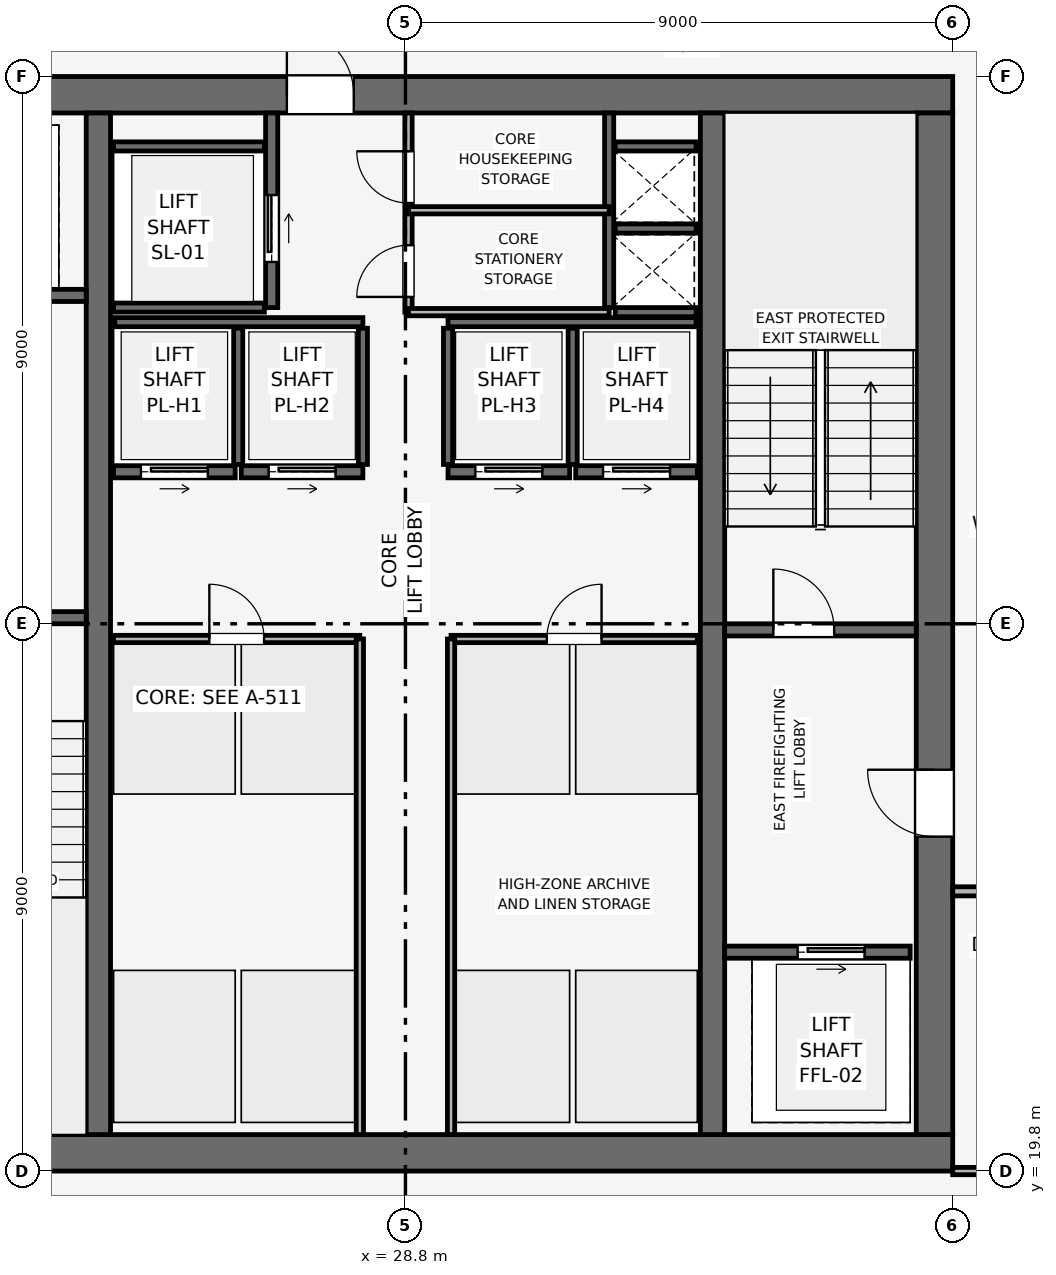
"""IFC4 building model, lengths in metres.
Left out: names, types, materials, properties, quantities, classifications, styles, units other than length and angle.
Written with IfcOpenShell. Run it as: python <this file> out.ifc"""

import sys

from ifc_helpers import new_model, si_unit, direction, frame, frame_2d, origin, place, context, subcontext, project, spatial, rectangle, extrude, element, fill, save


model = new_model("IFC4")
c1 = context("Model", 3, precision=1e-05, world=origin(), true_north=direction((0.0, 1.0)))
c2 = subcontext(c1, "Body", "Model", "MODEL_VIEW")
j1 = project(units=[si_unit("LENGTHUNIT", "METRE"), si_unit("PLANEANGLEUNIT", "RADIAN")], contexts=[c1])
p1 = place(None, origin())
s1 = spatial("IfcSite", under=j1, at=p1, CompositionType="ELEMENT")
p2 = place(p1, origin())
s2 = spatial("IfcBuilding", under=s1, at=p2, CompositionType="ELEMENT")
p3 = place(p2, frame((0.0, 0.0, 340.5)))
s3 = spatial("IfcBuildingStorey", under=s2, at=p3, CompositionType="ELEMENT", Elevation=340.5)
p4 = place(p3, frame((19.8, 20.1, 0.0), z_axis=(0.0, 0.0, 1.0), x_axis=(1.0, 0.0, 0.0)))
e1 = element("IfcWall", 1, at=p4, inside=s3, PredefinedType="SHEAR", context=c2, shape_type="SweptSolid", body=[
    extrude(rectangle(XDim=18.0, YDim=0.6, at=frame_2d((9.0, 0.0))), origin(), (0.0, 0.0, 1.0), 3.75),
])
p5 = place(p3, frame((19.8, 37.5, 0.0), z_axis=(0.0, 0.0, 1.0), x_axis=(1.0, 0.0, 0.0)))
e2 = element("IfcWall", 2, at=p5, inside=s3, PredefinedType="SHEAR", context=c2, shape_type="SweptSolid", body=[
    extrude(rectangle(XDim=18.0, YDim=0.6, at=frame_2d((9.0, 0.0))), origin(), (0.0, 0.0, 1.0), 3.75),
])
p6 = place(p5, frame((7.05, 0.0, 0.0)))
e3 = element("IfcOpeningElement", 3, at=p6, cuts=e2, PredefinedType="OPENING", context=c2, shape_type="SweptSolid", body=[
    extrude(rectangle(XDim=1.1, YDim=2.15, at=frame_2d((0.55, 1.075))), frame((0.0, 0.31, 0.0), z_axis=(0.0, -1.0, 0.0), x_axis=(1.0, 0.0, 0.0)), (0.0, 0.0, 1.0), 0.62),
])
p7 = place(p3, frame((37.5, 20.4, 0.0), z_axis=(0.0, 0.0, 1.0), x_axis=(0.0, 1.0, 0.0)))
e4 = element("IfcWall", 4, at=p7, inside=s3, PredefinedType="SHEAR", context=c2, shape_type="SweptSolid", body=[
    extrude(rectangle(XDim=16.8, YDim=0.6, at=frame_2d((8.4, 0.0))), origin(), (0.0, 0.0, 1.0), 3.75),
])
p8 = place(p7, frame((4.9, 0.0, 0.0)))
e5 = element("IfcOpeningElement", 5, at=p8, cuts=e4, PredefinedType="OPENING", context=c2, shape_type="SweptSolid", body=[
    extrude(rectangle(XDim=1.1, YDim=2.15, at=frame_2d((0.55, 1.075))), frame((0.0, 0.31, 0.0), z_axis=(0.0, -1.0, 0.0), x_axis=(1.0, 0.0, 0.0)), (0.0, 0.0, 1.0), 0.62),
])
for number, where, z_axis, x_axis in (
    (6, (23.75, 20.4, 0.0), (0.0, 0.0, 1.0), (0.0, 1.0, 0.0)),
    (7, (33.85, 20.4, 0.0), (0.0, 0.0, 1.0), (0.0, 1.0, 0.0)),
):
    element("IfcWall", number, at=place(p3, frame(where, z_axis=z_axis, x_axis=x_axis)), inside=s3, PredefinedType="SHEAR", context=c2, shape_type="SweptSolid", body=[
        extrude(rectangle(XDim=16.8, YDim=0.4, at=frame_2d((8.4, 0.0))), origin(), (0.0, 0.0, 1.0), 3.75),
    ])
p9 = place(p3, frame((20.4, 28.9, 0.0), z_axis=(0.0, 0.0, 1.0), x_axis=(1.0, 0.0, 0.0)))
e8 = element("IfcWall", 8, at=p9, inside=s3, PredefinedType="SHEAR", context=c2, shape_type="SweptSolid", body=[
    extrude(rectangle(XDim=3.15, YDim=0.2, at=frame_2d((1.575, 0.0))), origin(), (0.0, 0.0, 1.0), 3.51),
])
p10 = place(p9, frame((0.8, 0.0, 0.0)))
e9 = element("IfcOpeningElement", 9, at=p10, cuts=e8, PredefinedType="OPENING", context=c2, shape_type="SweptSolid", body=[
    extrude(rectangle(XDim=1.0, YDim=2.1, at=frame_2d((0.5, 1.05))), frame((0.0, 0.11, 0.0), z_axis=(0.0, -1.0, 0.0), x_axis=(1.0, 0.0, 0.0)), (0.0, 0.0, 1.0), 0.22),
])
p11 = place(p3, frame((34.05, 28.7, 0.0), z_axis=(0.0, 0.0, 1.0), x_axis=(1.0, 0.0, 0.0)))
e10 = element("IfcWall", 10, at=p11, inside=s3, PredefinedType="SHEAR", context=c2, shape_type="SweptSolid", body=[
    extrude(rectangle(XDim=3.15, YDim=0.2, at=frame_2d((1.575, 0.0))), origin(), (0.0, 0.0, 1.0), 3.51),
])
p12 = place(p11, frame((0.8, 0.0, 0.0)))
e11 = element("IfcOpeningElement", 11, at=p12, cuts=e10, PredefinedType="OPENING", context=c2, shape_type="SweptSolid", body=[
    extrude(rectangle(XDim=1.0, YDim=2.1, at=frame_2d((0.5, 1.05))), frame((0.0, 0.11, 0.0), z_axis=(0.0, -1.0, 0.0), x_axis=(1.0, 0.0, 0.0)), (0.0, 0.0, 1.0), 0.22),
])
p13 = place(p3, frame((32.15, 34.0, 0.0), z_axis=(0.0, 0.0, 1.0), x_axis=(0.0, 1.0, 0.0)))
e12 = element("IfcWall", 12, at=p13, inside=s3, PredefinedType="SHEAR", context=c2, shape_type="SweptSolid", body=[
    extrude(rectangle(XDim=3.2, YDim=0.15, at=frame_2d((1.6, 0.0))), origin(), (0.0, 0.0, 1.0), 3.51),
])
for number, where, z_axis, x_axis in (
    (13, (32.25, 33.925, 0.0), (0.0, 0.0, 1.0), (1.0, 0.0, 0.0)),
    (14, (32.25, 35.3, 0.0), (0.0, 0.0, 1.0), (1.0, 0.0, 0.0)),
):
    element("IfcWall", number, at=place(p3, frame(where, z_axis=z_axis, x_axis=x_axis)), inside=s3, PredefinedType="SHEAR", context=c2, shape_type="SweptSolid", body=[
        extrude(rectangle(XDim=1.33, YDim=0.15, at=frame_2d((0.665, 0.0))), origin(), (0.0, 0.0, 1.0), 3.51),
    ])
p14 = place(p3, frame((20.5, 34.2, 0.0), z_axis=(0.0, 0.0, 1.0), x_axis=(1.0, 0.0, 0.0)))
e15 = element("IfcWall", 15, at=p14, inside=s3, PredefinedType="SHEAR", context=c2, shape_type="SweptSolid", body=[
    extrude(rectangle(XDim=3.05, YDim=0.2, at=frame_2d((1.525, 0.0))), origin(), (0.0, 0.0, 1.0), 3.51),
])
p15 = place(p14, frame((0.75, 0.0, 0.0)))
e16 = element("IfcOpeningElement", 16, at=p15, cuts=e15, PredefinedType="OPENING", context=c2, shape_type="SweptSolid", body=[
    extrude(rectangle(XDim=1.1, YDim=2.15, at=frame_2d((0.55, 1.075))), frame((0.0, 0.11, 0.0), z_axis=(0.0, -1.0, 0.0), x_axis=(1.0, 0.0, 0.0)), (0.0, 0.0, 1.0), 0.22),
])
p16 = place(p3, frame((34.05, 23.4, 0.0), z_axis=(0.0, 0.0, 1.0), x_axis=(1.0, 0.0, 0.0)))
e17 = element("IfcWall", 17, at=p16, inside=s3, PredefinedType="SHEAR", context=c2, shape_type="SweptSolid", body=[
    extrude(rectangle(XDim=3.05, YDim=0.2, at=frame_2d((1.525, 0.0))), origin(), (0.0, 0.0, 1.0), 3.51),
])
p17 = place(p16, frame((1.2, 0.0, 0.0)))
e18 = element("IfcOpeningElement", 18, at=p17, cuts=e17, PredefinedType="OPENING", context=c2, shape_type="SweptSolid", body=[
    extrude(rectangle(XDim=1.1, YDim=2.15, at=frame_2d((0.55, 1.075))), frame((0.0, 0.11, 0.0), z_axis=(0.0, -1.0, 0.0), x_axis=(1.0, 0.0, 0.0)), (0.0, 0.0, 1.0), 0.22),
])
p18 = place(p3, frame((26.6, 34.0, 0.0), z_axis=(0.0, 0.0, 1.0), x_axis=(0.0, 1.0, 0.0)))
e19 = element("IfcWall", 19, at=p18, inside=s3, PredefinedType="SHEAR", context=c2, shape_type="SweptSolid", body=[
    extrude(rectangle(XDim=3.2, YDim=0.2, at=frame_2d((1.6, 0.0))), origin(), (0.0, 0.0, 1.0), 3.51),
])
p19 = place(p18, frame((0.75, 0.0, 0.0)))
e20 = element("IfcOpeningElement", 20, at=p19, cuts=e19, PredefinedType="OPENING", context=c2, shape_type="SweptSolid", body=[
    extrude(rectangle(XDim=1.1, YDim=2.15, at=frame_2d((0.55, 1.075))), frame((0.0, 0.11, 0.0), z_axis=(0.0, -1.0, 0.0), x_axis=(1.0, 0.0, 0.0)), (0.0, 0.0, 1.0), 0.22),
])
for number, where, z_axis, x_axis in (
    (21, (24.0, 34.0, 0.0), (0.0, 0.0, 1.0), (1.0, 0.0, 0.0)),
    (22, (24.0, 36.65, 0.0), (0.0, 0.0, 1.0), (1.0, 0.0, 0.0)),
):
    element("IfcWall", number, at=place(p3, frame(where, z_axis=z_axis, x_axis=x_axis)), inside=s3, PredefinedType="SHEAR", context=c2, shape_type="SweptSolid", body=[
        extrude(rectangle(XDim=2.48, YDim=0.15, at=frame_2d((1.24, 0.0))), origin(), (0.0, 0.0, 1.0), 3.51),
    ])
p20 = place(p3, frame((24.0, 31.3, 0.0), z_axis=(0.0, 0.0, 1.0), x_axis=(1.0, 0.0, 0.0)))
e23 = element("IfcWall", 23, at=p20, inside=s3, PredefinedType="SHEAR", context=c2, shape_type="SweptSolid", body=[
    extrude(rectangle(XDim=2.0, YDim=0.2, at=frame_2d((1.0, 0.0))), origin(), (0.0, 0.0, 1.0), 3.51),
])
p21 = place(p20, frame((0.45, 0.0, 0.0)))
e24 = element("IfcOpeningElement", 24, at=p21, cuts=e23, PredefinedType="OPENING", context=c2, shape_type="SweptSolid", body=[
    extrude(rectangle(XDim=1.1, YDim=2.15, at=frame_2d((0.55, 1.075))), frame((0.0, 0.11, 0.0), z_axis=(0.0, -1.0, 0.0), x_axis=(1.0, 0.0, 0.0)), (0.0, 0.0, 1.0), 0.22),
])
p22 = place(p3, frame((26.1, 31.3, 0.0), z_axis=(0.0, 0.0, 1.0), x_axis=(1.0, 0.0, 0.0)))
e25 = element("IfcWall", 25, at=p22, inside=s3, PredefinedType="SHEAR", context=c2, shape_type="SweptSolid", body=[
    extrude(rectangle(XDim=2.0, YDim=0.2, at=frame_2d((1.0, 0.0))), origin(), (0.0, 0.0, 1.0), 3.51),
])
p23 = place(p22, frame((0.45, 0.0, 0.0)))
e26 = element("IfcOpeningElement", 26, at=p23, cuts=e25, PredefinedType="OPENING", context=c2, shape_type="SweptSolid", body=[
    extrude(rectangle(XDim=1.1, YDim=2.15, at=frame_2d((0.55, 1.075))), frame((0.0, 0.11, 0.0), z_axis=(0.0, -1.0, 0.0), x_axis=(1.0, 0.0, 0.0)), (0.0, 0.0, 1.0), 0.22),
])
p24 = place(p3, frame((29.5, 31.3, 0.0), z_axis=(0.0, 0.0, 1.0), x_axis=(1.0, 0.0, 0.0)))
e27 = element("IfcWall", 27, at=p24, inside=s3, PredefinedType="SHEAR", context=c2, shape_type="SweptSolid", body=[
    extrude(rectangle(XDim=2.0, YDim=0.2, at=frame_2d((1.0, 0.0))), origin(), (0.0, 0.0, 1.0), 3.51),
])
p25 = place(p24, frame((0.45, 0.0, 0.0)))
e28 = element("IfcOpeningElement", 28, at=p25, cuts=e27, PredefinedType="OPENING", context=c2, shape_type="SweptSolid", body=[
    extrude(rectangle(XDim=1.1, YDim=2.15, at=frame_2d((0.55, 1.075))), frame((0.0, 0.11, 0.0), z_axis=(0.0, -1.0, 0.0), x_axis=(1.0, 0.0, 0.0)), (0.0, 0.0, 1.0), 0.22),
])
p26 = place(p3, frame((31.6, 31.3, 0.0), z_axis=(0.0, 0.0, 1.0), x_axis=(1.0, 0.0, 0.0)))
e29 = element("IfcWall", 29, at=p26, inside=s3, PredefinedType="SHEAR", context=c2, shape_type="SweptSolid", body=[
    extrude(rectangle(XDim=2.0, YDim=0.2, at=frame_2d((1.0, 0.0))), origin(), (0.0, 0.0, 1.0), 3.51),
])
p27 = place(p26, frame((0.45, 0.0, 0.0)))
e30 = element("IfcOpeningElement", 30, at=p27, cuts=e29, PredefinedType="OPENING", context=c2, shape_type="SweptSolid", body=[
    extrude(rectangle(XDim=1.1, YDim=2.15, at=frame_2d((0.55, 1.075))), frame((0.0, 0.11, 0.0), z_axis=(0.0, -1.0, 0.0), x_axis=(1.0, 0.0, 0.0)), (0.0, 0.0, 1.0), 0.22),
])
p28 = place(p3, frame((32.25, 36.65, 0.0), z_axis=(0.0, 0.0, 1.0), x_axis=(1.0, 0.0, 0.0)))
e31 = element("IfcWall", 31, at=p28, inside=s3, PredefinedType="SHEAR", context=c2, shape_type="SweptSolid", body=[
    extrude(rectangle(XDim=1.33, YDim=0.15, at=frame_2d((0.665, 0.0))), origin(), (0.0, 0.0, 1.0), 3.51),
])
for number, where, z_axis, x_axis in (
    (32, (24.02, 33.76, 0.0), (0.0, 0.0, 1.0), (1.0, 0.0, 0.0)),
    (33, (29.5, 33.76, 0.0), (0.0, 0.0, 1.0), (1.0, 0.0, 0.0)),
):
    element("IfcWall", number, at=place(p3, frame(where, z_axis=z_axis, x_axis=x_axis)), inside=s3, PredefinedType="SHEAR", context=c2, shape_type="SweptSolid", body=[
        extrude(rectangle(XDim=4.08, YDim=0.15, at=frame_2d((2.04, 0.0))), origin(), (0.0, 0.0, 1.0), 3.51),
    ])
for number, where, z_axis, x_axis in (
    (34, (26.05, 31.42, 0.0), (0.0, 0.0, 1.0), (0.0, 1.0, 0.0)),
    (35, (28.1, 31.42, 0.0), (0.0, 0.0, 1.0), (0.0, 1.0, 0.0)),
    (36, (29.5, 31.42, 0.0), (0.0, 0.0, 1.0), (0.0, 1.0, 0.0)),
    (37, (31.55, 31.42, 0.0), (0.0, 0.0, 1.0), (0.0, 1.0, 0.0)),
):
    element("IfcWall", number, at=place(p3, frame(where, z_axis=z_axis, x_axis=x_axis)), inside=s3, PredefinedType="SHEAR", context=c2, shape_type="SweptSolid", body=[
        extrude(rectangle(XDim=2.24, YDim=0.15, at=frame_2d((1.12, 0.0))), origin(), (0.0, 0.0, 1.0), 3.51),
    ])
p29 = place(p3, frame((28.85, 33.925, 0.0), z_axis=(0.0, 0.0, 1.0), x_axis=(0.0, 1.0, 0.0)))
e38 = element("IfcWall", 38, at=p29, inside=s3, PredefinedType="PARTITIONING", context=c2, shape_type="SweptSolid", body=[
    extrude(rectangle(XDim=3.275, YDim=0.12, at=frame_2d((1.637, 0.0))), origin(), (0.0, 0.0, 1.0), 3.51),
])
p30 = place(p29, frame((0.25, 0.0, 0.0)))
e39 = element("IfcOpeningElement", 39, at=p30, cuts=e38, PredefinedType="OPENING", context=c2, shape_type="SweptSolid", body=[
    extrude(rectangle(XDim=0.85, YDim=2.1, at=frame_2d((0.425, 1.05))), frame((0.0, 0.07, 0.0), z_axis=(0.0, -1.0, 0.0), x_axis=(1.0, 0.0, 0.0)), (0.0, 0.0, 1.0), 0.14),
])
p31 = place(p29, frame((1.795, 0.0, 0.0)))
e40 = element("IfcOpeningElement", 40, at=p31, cuts=e38, PredefinedType="OPENING", context=c2, shape_type="SweptSolid", body=[
    extrude(rectangle(XDim=0.85, YDim=2.1, at=frame_2d((0.425, 1.05))), frame((0.0, 0.07, 0.0), z_axis=(0.0, -1.0, 0.0), x_axis=(1.0, 0.0, 0.0)), (0.0, 0.0, 1.0), 0.14),
])
for number, where, z_axis, x_axis in (
    (41, (28.85, 35.6, 0.0), (0.0, 0.0, 1.0), (1.0, 0.0, 0.0)),
    (42, (28.85, 33.925, 0.0), (0.0, 0.0, 1.0), (1.0, 0.0, 0.0)),
):
    element("IfcWall", number, at=place(p3, frame(where, z_axis=z_axis, x_axis=x_axis)), inside=s3, PredefinedType="PARTITIONING", context=c2, shape_type="SweptSolid", body=[
        extrude(rectangle(XDim=3.3, YDim=0.12, at=frame_2d((1.65, 0.0))), origin(), (0.0, 0.0, 1.0), 3.51),
    ])
p32 = place(p3, frame((24.0, 28.55, 0.0), z_axis=(0.0, 0.0, 1.0), x_axis=(1.0, 0.0, 0.0)))
e43 = element("IfcWall", 43, at=p32, inside=s3, PredefinedType="PARTITIONING", context=c2, shape_type="SweptSolid", body=[
    extrude(rectangle(XDim=4.05, YDim=0.12, at=frame_2d((2.025, 0.0))), origin(), (0.0, 0.0, 1.0), 3.51),
])
p33 = place(p32, frame((1.575, 0.0, 0.0)))
e44 = element("IfcOpeningElement", 44, at=p33, cuts=e43, PredefinedType="OPENING", context=c2, shape_type="SweptSolid", body=[
    extrude(rectangle(XDim=0.9, YDim=2.1, at=frame_2d((0.45, 1.05))), frame((0.0, 0.07, 0.0), z_axis=(0.0, -1.0, 0.0), x_axis=(1.0, 0.0, 0.0)), (0.0, 0.0, 1.0), 0.14),
])
p34 = place(p3, frame((28.05, 20.4, 0.0), z_axis=(0.0, 0.0, 1.0), x_axis=(0.0, 1.0, 0.0)))
e45 = element("IfcWall", 45, at=p34, inside=s3, PredefinedType="PARTITIONING", context=c2, shape_type="SweptSolid", body=[
    extrude(rectangle(XDim=8.15, YDim=0.12, at=frame_2d((4.075, 0.0))), origin(), (0.0, 0.0, 1.0), 3.51),
])
p35 = place(p3, frame((29.55, 28.55, 0.0), z_axis=(0.0, 0.0, 1.0), x_axis=(1.0, 0.0, 0.0)))
e46 = element("IfcWall", 46, at=p35, inside=s3, PredefinedType="PARTITIONING", context=c2, shape_type="SweptSolid", body=[
    extrude(rectangle(XDim=4.05, YDim=0.12, at=frame_2d((2.025, 0.0))), origin(), (0.0, 0.0, 1.0), 3.51),
])
p36 = place(p35, frame((1.575, 0.0, 0.0)))
e47 = element("IfcOpeningElement", 47, at=p36, cuts=e46, PredefinedType="OPENING", context=c2, shape_type="SweptSolid", body=[
    extrude(rectangle(XDim=0.9, YDim=2.1, at=frame_2d((0.45, 1.05))), frame((0.0, 0.07, 0.0), z_axis=(0.0, -1.0, 0.0), x_axis=(1.0, 0.0, 0.0)), (0.0, 0.0, 1.0), 0.14),
])
p37 = place(p3, frame((29.55, 20.4, 0.0), z_axis=(0.0, 0.0, 1.0), x_axis=(0.0, 1.0, 0.0)))
e48 = element("IfcWall", 48, at=p37, inside=s3, PredefinedType="PARTITIONING", context=c2, shape_type="SweptSolid", body=[
    extrude(rectangle(XDim=8.15, YDim=0.12, at=frame_2d((4.075, 0.0))), origin(), (0.0, 0.0, 1.0), 3.51),
])
p38 = place(p3, frame((37.8, 19.8, 0.0), z_axis=(0.0, 0.0, 1.0), x_axis=(1.0, 0.0, 0.0)))
e49 = element("IfcWall", 49, at=p38, inside=s3, PredefinedType="PARTITIONING", context=c2, shape_type="SweptSolid", body=[
    extrude(rectangle(XDim=13.07, YDim=0.12, at=frame_2d((6.535, 0.0))), origin(), (0.0, 0.0, 1.0), 3.095),
])
p39 = place(p3, frame((37.8, 24.4, 0.0), z_axis=(0.0, 0.0, 1.0), x_axis=(1.0, 0.0, 0.0)))
e50 = element("IfcWall", 50, at=p39, inside=s3, PredefinedType="PARTITIONING", context=c2, shape_type="SweptSolid", body=[
    extrude(rectangle(XDim=1.9, YDim=0.15, at=frame_2d((0.95, 0.0))), origin(), (0.0, 0.0, 1.0), 3.51),
])
p40 = place(p39, frame((0.45, 0.0, 0.0)))
e51 = element("IfcOpeningElement", 51, at=p40, cuts=e50, PredefinedType="OPENING", context=c2, shape_type="SweptSolid", body=[
    extrude(rectangle(XDim=0.9, YDim=2.1, at=frame_2d((0.45, 1.05))), frame((0.0, 0.085, 0.0), z_axis=(0.0, -1.0, 0.0), x_axis=(1.0, 0.0, 0.0)), (0.0, 0.0, 1.0), 0.17),
])
p41 = place(p12, origin())
e52 = element("IfcDoor", 52, at=p41, inside=s3, OperationType="SINGLE_SWING_LEFT", PredefinedType="DOOR", context=c2, shape_type="SweptSolid", body=[
    extrude(rectangle(XDim=1.0, YDim=2.1, at=frame_2d((0.5, 1.05))), frame((0.0, 0.025, 0.0), z_axis=(0.0, -1.0, 0.0), x_axis=(1.0, 0.0, 0.0)), (0.0, 0.0, 1.0), 0.05),
])
fill(e11, e52)
p42 = place(p17, origin())
e53 = element("IfcDoor", 53, at=p42, inside=s3, OperationType="SLIDING_TO_RIGHT", PredefinedType="DOOR", context=c2, shape_type="SweptSolid", body=[
    extrude(rectangle(XDim=1.1, YDim=2.15, at=frame_2d((0.55, 1.075))), frame((0.0, 0.025, 0.0), z_axis=(0.0, -1.0, 0.0), x_axis=(1.0, 0.0, 0.0)), (0.0, 0.0, 1.0), 0.05),
])
fill(e18, e53)
p43 = place(p19, origin())
e54 = element("IfcDoor", 54, at=p43, inside=s3, OperationType="SLIDING_TO_RIGHT", PredefinedType="DOOR", context=c2, shape_type="SweptSolid", body=[
    extrude(rectangle(XDim=1.1, YDim=2.15, at=frame_2d((0.55, 1.075))), frame((0.0, 0.025, 0.0), z_axis=(0.0, -1.0, 0.0), x_axis=(1.0, 0.0, 0.0)), (0.0, 0.0, 1.0), 0.05),
])
fill(e20, e54)
p44 = place(p21, origin())
e55 = element("IfcDoor", 55, at=p44, inside=s3, OperationType="SLIDING_TO_RIGHT", PredefinedType="DOOR", context=c2, shape_type="SweptSolid", body=[
    extrude(rectangle(XDim=1.1, YDim=2.15, at=frame_2d((0.55, 1.075))), frame((0.0, 0.025, 0.0), z_axis=(0.0, -1.0, 0.0), x_axis=(1.0, 0.0, 0.0)), (0.0, 0.0, 1.0), 0.05),
])
fill(e24, e55)
p45 = place(p23, origin())
e56 = element("IfcDoor", 56, at=p45, inside=s3, OperationType="SLIDING_TO_RIGHT", PredefinedType="DOOR", context=c2, shape_type="SweptSolid", body=[
    extrude(rectangle(XDim=1.1, YDim=2.15, at=frame_2d((0.55, 1.075))), frame((0.0, 0.025, 0.0), z_axis=(0.0, -1.0, 0.0), x_axis=(1.0, 0.0, 0.0)), (0.0, 0.0, 1.0), 0.05),
])
fill(e26, e56)
p46 = place(p25, origin())
e57 = element("IfcDoor", 57, at=p46, inside=s3, OperationType="SLIDING_TO_RIGHT", PredefinedType="DOOR", context=c2, shape_type="SweptSolid", body=[
    extrude(rectangle(XDim=1.1, YDim=2.15, at=frame_2d((0.55, 1.075))), frame((0.0, 0.025, 0.0), z_axis=(0.0, -1.0, 0.0), x_axis=(1.0, 0.0, 0.0)), (0.0, 0.0, 1.0), 0.05),
])
fill(e28, e57)
p47 = place(p27, origin())
e58 = element("IfcDoor", 58, at=p47, inside=s3, OperationType="SLIDING_TO_RIGHT", PredefinedType="DOOR", context=c2, shape_type="SweptSolid", body=[
    extrude(rectangle(XDim=1.1, YDim=2.15, at=frame_2d((0.55, 1.075))), frame((0.0, 0.025, 0.0), z_axis=(0.0, -1.0, 0.0), x_axis=(1.0, 0.0, 0.0)), (0.0, 0.0, 1.0), 0.05),
])
fill(e30, e58)
p48 = place(p30, origin())
e59 = element("IfcDoor", 59, at=p48, inside=s3, OperationType="SINGLE_SWING_LEFT", PredefinedType="DOOR", context=c2, shape_type="SweptSolid", body=[
    extrude(rectangle(XDim=0.85, YDim=2.1, at=frame_2d((0.425, 1.05))), frame((0.0, 0.025, 0.0), z_axis=(0.0, -1.0, 0.0), x_axis=(1.0, 0.0, 0.0)), (0.0, 0.0, 1.0), 0.05),
])
fill(e39, e59)
p49 = place(p31, origin())
e60 = element("IfcDoor", 60, at=p49, inside=s3, OperationType="SINGLE_SWING_RIGHT", PredefinedType="DOOR", context=c2, shape_type="SweptSolid", body=[
    extrude(rectangle(XDim=0.85, YDim=2.1, at=frame_2d((0.425, 1.05))), frame((0.0, 0.025, 0.0), z_axis=(0.0, -1.0, 0.0), x_axis=(1.0, 0.0, 0.0)), (0.0, 0.0, 1.0), 0.05),
])
fill(e40, e60)
p50 = place(p33, origin())
e61 = element("IfcDoor", 61, at=p50, inside=s3, OperationType="SINGLE_SWING_LEFT", PredefinedType="DOOR", context=c2, shape_type="SweptSolid", body=[
    extrude(rectangle(XDim=0.9, YDim=2.1, at=frame_2d((0.45, 1.05))), frame((0.0, 0.025, 0.0), z_axis=(0.0, -1.0, 0.0), x_axis=(1.0, 0.0, 0.0)), (0.0, 0.0, 1.0), 0.05),
])
fill(e44, e61)
p51 = place(p36, origin())
e62 = element("IfcDoor", 62, at=p51, inside=s3, OperationType="SINGLE_SWING_RIGHT", PredefinedType="DOOR", context=c2, shape_type="SweptSolid", body=[
    extrude(rectangle(XDim=0.9, YDim=2.1, at=frame_2d((0.45, 1.05))), frame((0.0, 0.025, 0.0), z_axis=(0.0, -1.0, 0.0), x_axis=(1.0, 0.0, 0.0)), (0.0, 0.0, 1.0), 0.05),
])
fill(e47, e62)
p52 = place(p8, origin())
e63 = element("IfcDoor", 63, at=p52, inside=s3, OperationType="SINGLE_SWING_RIGHT", PredefinedType="DOOR", context=c2, shape_type="SweptSolid", body=[
    extrude(rectangle(XDim=1.1, YDim=2.15, at=frame_2d((0.55, 1.075))), frame((0.0, 0.025, 0.0), z_axis=(0.0, -1.0, 0.0), x_axis=(1.0, 0.0, 0.0)), (0.0, 0.0, 1.0), 0.05),
])
fill(e5, e63)
p53 = place(p6, origin())
e64 = element("IfcDoor", 64, at=p53, inside=s3, OperationType="SINGLE_SWING_LEFT", PredefinedType="DOOR", context=c2, shape_type="SweptSolid", body=[
    extrude(rectangle(XDim=1.1, YDim=2.15, at=frame_2d((0.55, 1.075))), frame((0.0, 0.025, 0.0), z_axis=(0.0, -1.0, 0.0), x_axis=(1.0, 0.0, 0.0)), (0.0, 0.0, 1.0), 0.05),
])
fill(e3, e64)
save(model, sys.argv[1])
